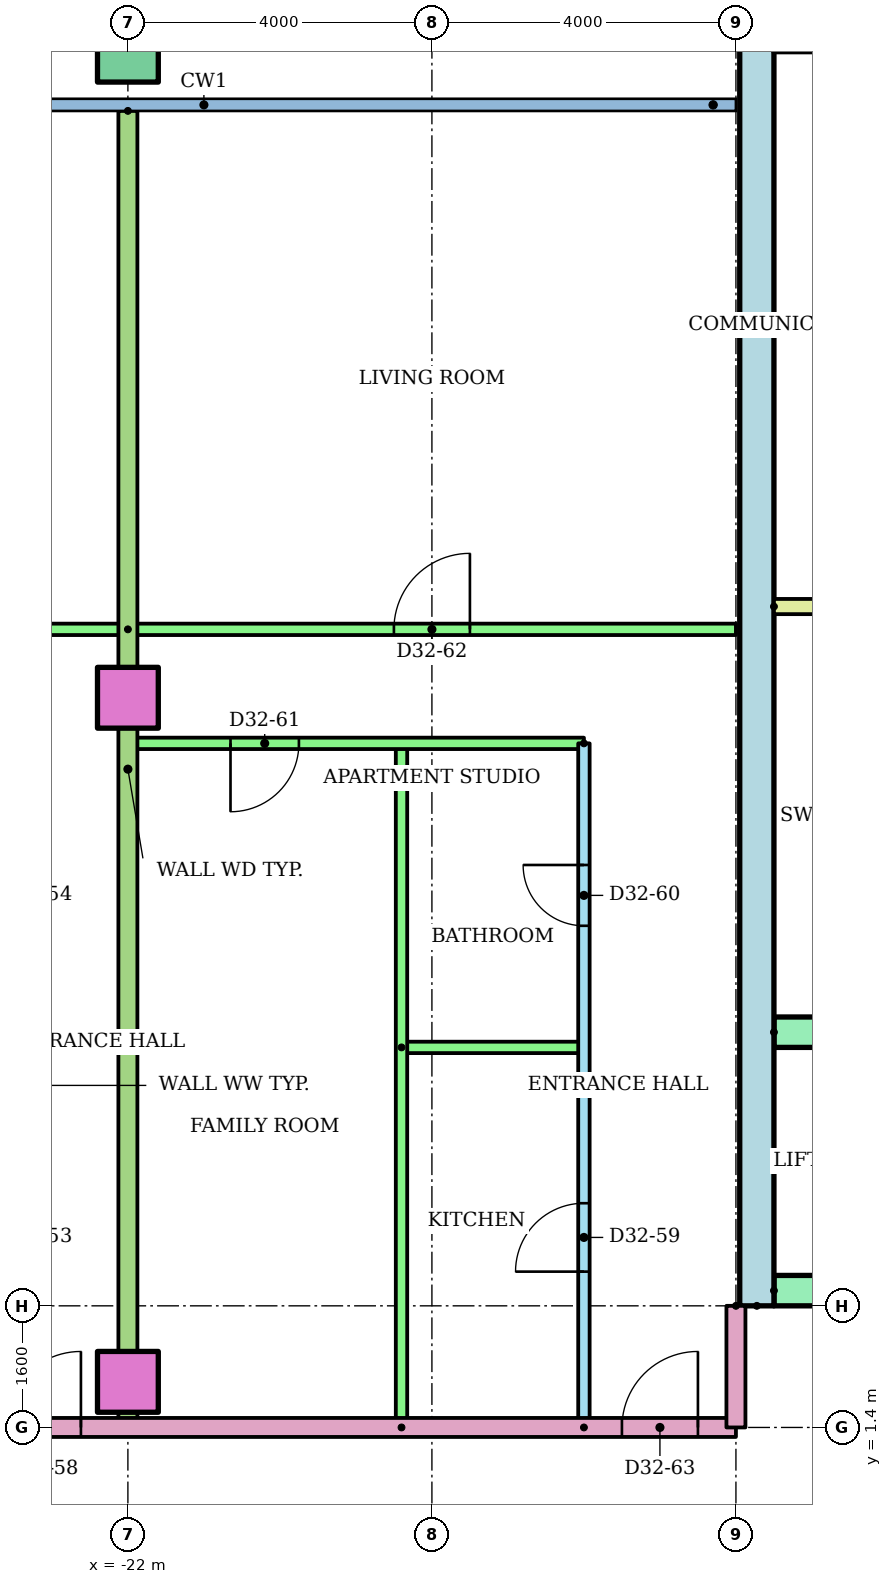
"""IFC4 building model, lengths in metres.
Left out: names, types, materials, properties, quantities, classifications, styles, units other than length and angle.
Written with IfcOpenShell. Run it as: python <this file> out.ifc"""

import sys

from ifc_helpers import new_model, si_unit, direction, frame, frame_2d, origin, origin_2d, place, context, subcontext, project, spatial, rectangle, hollow_rectangle, extrude, element, fill, save


model = new_model("IFC4")
c1 = context("Model", 3, precision=1e-05, world=origin(), true_north=direction((0.0, 1.0)))
c2 = subcontext(c1, "Body", "Model", "MODEL_VIEW")
j1 = project(units=[si_unit("LENGTHUNIT", "METRE"), si_unit("PLANEANGLEUNIT", "RADIAN")], contexts=[c1])
p1 = place(None, origin())
s1 = spatial("IfcSite", under=j1, at=p1, CompositionType="ELEMENT")
p2 = place(p1, origin())
s2 = spatial("IfcBuilding", under=s1, at=p2, CompositionType="ELEMENT")
p3 = place(p2, frame((0.0, 0.0, 126.2)))
s3 = spatial("IfcBuildingStorey", under=s2, at=p3, CompositionType="ELEMENT", Elevation=126.2)
for number, where in (
    (1, (-22.0, 2.0, 0.0)),
    (2, (-22.0, 11.0, 0.0)),
):
    element("IfcColumn", number, at=place(p3, frame(where)), inside=s3, PredefinedType="COLUMN", context=c2, shape_type="SweptSolid", body=[
        extrude(rectangle(XDim=0.8, YDim=0.8, at=origin_2d()), origin(), (0.0, 0.0, 1.0), 3.2),
    ])
p4 = place(p3, frame((-22.0, 19.5, 0.0)))
e3 = element("IfcColumn", 3, at=p4, inside=s3, PredefinedType="COLUMN", context=c2, shape_type="SweptSolid", body=[
    extrude(hollow_rectangle(XDim=0.8, YDim=0.8, WallThickness=0.04, at=origin_2d()), origin(), (0.0, 0.0, 1.0), 3.2),
])
p5 = place(p3, frame((-13.725, 3.0, 0.0), z_axis=(0.0, 0.0, 1.0), x_axis=(0.0, 1.0, 0.0)))
e4 = element("IfcWall", 4, at=p5, inside=s3, PredefinedType="SHEAR", context=c2, shape_type="SweptSolid", body=[
    extrude(rectangle(XDim=17.0, YDim=0.45, at=frame_2d((8.5, 0.0))), origin(), (0.0, 0.0, 1.0), 2.92),
])
p6 = place(p3, frame((-13.5, 3.2, 0.0)))
e5 = element("IfcWall", 5, at=p6, inside=s3, PredefinedType="SHEAR", context=c2, shape_type="SweptSolid", body=[
    extrude(rectangle(XDim=27.0, YDim=0.4, at=frame_2d((13.5, 0.0))), origin(), (0.0, 0.0, 1.0), 2.92),
])
p7 = place(p6, frame((6.861, 0.0, 0.0)))
e6 = element("IfcOpeningElement", 6, at=p7, cuts=e5, PredefinedType="OPENING", context=c2, shape_type="SweptSolid", body=[
    extrude(rectangle(XDim=1.1, YDim=2.1, at=frame_2d((0.55, 1.05))), frame((0.0, 0.21, 0.0), z_axis=(0.0, -1.0, 0.0), x_axis=(1.0, 0.0, 0.0)), (0.0, 0.0, 1.0), 0.42),
])
p8 = place(p6, frame((9.906, 0.0, 0.0)))
e7 = element("IfcOpeningElement", 7, at=p8, cuts=e5, PredefinedType="OPENING", context=c2, shape_type="SweptSolid", body=[
    extrude(rectangle(XDim=1.1, YDim=2.1, at=frame_2d((0.55, 1.05))), frame((0.0, 0.21, 0.0), z_axis=(0.0, -1.0, 0.0), x_axis=(1.0, 0.0, 0.0)), (0.0, 0.0, 1.0), 0.42),
])
p9 = place(p6, frame((15.994, 0.0, 0.0)))
e8 = element("IfcOpeningElement", 8, at=p9, cuts=e5, PredefinedType="OPENING", context=c2, shape_type="SweptSolid", body=[
    extrude(rectangle(XDim=1.1, YDim=2.1, at=frame_2d((0.55, 1.05))), frame((0.0, 0.21, 0.0), z_axis=(0.0, -1.0, 0.0), x_axis=(1.0, 0.0, 0.0)), (0.0, 0.0, 1.0), 0.42),
])
p10 = place(p6, frame((19.039, 0.0, 0.0)))
e9 = element("IfcOpeningElement", 9, at=p10, cuts=e5, PredefinedType="OPENING", context=c2, shape_type="SweptSolid", body=[
    extrude(rectangle(XDim=1.1, YDim=2.1, at=frame_2d((0.55, 1.05))), frame((0.0, 0.21, 0.0), z_axis=(0.0, -1.0, 0.0), x_axis=(1.0, 0.0, 0.0)), (0.0, 0.0, 1.0), 0.42),
])
p11 = place(p6, frame((12.6, 0.0, 0.0)))
e10 = element("IfcOpeningElement", 10, at=p11, cuts=e5, PredefinedType="OPENING", context=c2, shape_type="SweptSolid", body=[
    extrude(rectangle(XDim=1.8, YDim=2.1, at=frame_2d((0.9, 1.05))), frame((0.0, 0.21, 0.0), z_axis=(0.0, -1.0, 0.0), x_axis=(1.0, 0.0, 0.0)), (0.0, 0.0, 1.0), 0.42),
])
p12 = place(p3, frame((-13.5, 6.6, 0.0)))
e11 = element("IfcWall", 11, at=p12, inside=s3, PredefinedType="SHEAR", context=c2, shape_type="SweptSolid", body=[
    extrude(rectangle(XDim=11.978, YDim=0.4, at=frame_2d((5.989, 0.0))), origin(), (0.0, 0.0, 1.0), 2.92),
])
p13 = place(p3, frame((-13.5, 12.2, 0.0)))
e12 = element("IfcWall", 12, at=p13, inside=s3, PredefinedType="PARTITIONING", context=c2, shape_type="SweptSolid", body=[
    extrude(rectangle(XDim=3.9, YDim=0.2, at=frame_2d((1.95, 0.0))), origin(), (0.0, 0.0, 1.0), 2.92),
])
p14 = place(p3, frame((-32.72, 11.9, 0.0)))
e13 = element("IfcWall", 13, at=p14, inside=s3, PredefinedType="PARTITIONING", context=c2, shape_type="SweptSolid", body=[
    extrude(rectangle(XDim=10.72, YDim=0.15, at=frame_2d((5.36, 0.0))), origin(), (0.0, 0.0, 1.0), 2.4),
])
p15 = place(p14, frame((1.102, 0.0, 0.0)))
e14 = element("IfcOpeningElement", 14, at=p15, cuts=e13, PredefinedType="OPENING", context=c2, shape_type="SweptSolid", body=[
    extrude(rectangle(XDim=1.0, YDim=2.1, at=frame_2d((0.5, 1.05))), frame((0.0, 0.085, 0.0), z_axis=(0.0, -1.0, 0.0), x_axis=(1.0, 0.0, 0.0)), (0.0, 0.0, 1.0), 0.17),
])
p16 = place(p14, frame((7.22, 0.0, 0.0)))
e15 = element("IfcOpeningElement", 15, at=p16, cuts=e13, PredefinedType="OPENING", context=c2, shape_type="SweptSolid", body=[
    extrude(rectangle(XDim=1.0, YDim=2.1, at=frame_2d((0.5, 1.05))), frame((0.0, 0.085, 0.0), z_axis=(0.0, -1.0, 0.0), x_axis=(1.0, 0.0, 0.0)), (0.0, 0.0, 1.0), 0.17),
])
p17 = place(p3, frame((-16.0, 1.4, 0.0), z_axis=(0.0, 0.0, 1.0), x_axis=(0.0, 1.0, 0.0)))
e16 = element("IfcWall", 16, at=p17, inside=s3, PredefinedType="PARTITIONING", context=c2, shape_type="SweptSolid", body=[
    extrude(rectangle(XDim=9.0, YDim=0.15, at=frame_2d((4.5, 0.0))), origin(), (0.0, 0.0, 1.0), 2.4),
])
p18 = place(p17, frame((2.05, 0.0, 0.0)))
e17 = element("IfcOpeningElement", 17, at=p18, cuts=e16, PredefinedType="OPENING", context=c2, shape_type="SweptSolid", body=[
    extrude(rectangle(XDim=0.9, YDim=2.1, at=frame_2d((0.45, 1.05))), frame((0.0, 0.085, 0.0), z_axis=(0.0, -1.0, 0.0), x_axis=(1.0, 0.0, 0.0)), (0.0, 0.0, 1.0), 0.17),
])
p19 = place(p17, frame((6.6, 0.0, 0.0)))
e18 = element("IfcOpeningElement", 18, at=p19, cuts=e16, PredefinedType="OPENING", context=c2, shape_type="SweptSolid", body=[
    extrude(rectangle(XDim=0.8, YDim=2.1, at=frame_2d((0.4, 1.05))), frame((0.0, 0.085, 0.0), z_axis=(0.0, -1.0, 0.0), x_axis=(1.0, 0.0, 0.0)), (0.0, 0.0, 1.0), 0.17),
])
p20 = place(p3, frame((-18.4, 6.4, 0.0)))
e19 = element("IfcWall", 19, at=p20, inside=s3, PredefinedType="PARTITIONING", context=c2, shape_type="SweptSolid", body=[
    extrude(rectangle(XDim=2.4, YDim=0.15, at=frame_2d((1.2, 0.0))), origin(), (0.0, 0.0, 1.0), 2.4),
])
p21 = place(p3, frame((-18.4, 1.4, 0.0), z_axis=(0.0, 0.0, 1.0), x_axis=(0.0, 1.0, 0.0)))
e20 = element("IfcWall", 20, at=p21, inside=s3, PredefinedType="PARTITIONING", context=c2, shape_type="SweptSolid", body=[
    extrude(rectangle(XDim=9.0, YDim=0.15, at=frame_2d((4.5, 0.0))), origin(), (0.0, 0.0, 1.0), 2.4),
])
p22 = place(p3, frame((-16.0, 10.4, 0.0), z_axis=(0.0, 0.0, 1.0), x_axis=(-1.0, 0.0, 0.0)))
e21 = element("IfcWall", 21, at=p22, inside=s3, PredefinedType="PARTITIONING", context=c2, shape_type="SweptSolid", body=[
    extrude(rectangle(XDim=6.0, YDim=0.15, at=frame_2d((3.0, 0.0))), origin(), (0.0, 0.0, 1.0), 2.4),
])
p23 = place(p22, frame((3.75, 0.0, 0.0)))
e22 = element("IfcOpeningElement", 22, at=p23, cuts=e21, PredefinedType="OPENING", context=c2, shape_type="SweptSolid", body=[
    extrude(rectangle(XDim=0.9, YDim=2.1, at=frame_2d((0.45, 1.05))), frame((0.0, 0.085, 0.0), z_axis=(0.0, -1.0, 0.0), x_axis=(1.0, 0.0, 0.0)), (0.0, 0.0, 1.0), 0.17),
])
p24 = place(p3, frame((-22.0, 11.9, 0.0)))
e23 = element("IfcWall", 23, at=p24, inside=s3, PredefinedType="PARTITIONING", context=c2, shape_type="SweptSolid", body=[
    extrude(rectangle(XDim=8.0, YDim=0.15, at=frame_2d((4.0, 0.0))), origin(), (0.0, 0.0, 1.0), 2.4),
])
p25 = place(p24, frame((3.5, 0.0, 0.0)))
e24 = element("IfcOpeningElement", 24, at=p25, cuts=e23, PredefinedType="OPENING", context=c2, shape_type="SweptSolid", body=[
    extrude(rectangle(XDim=1.0, YDim=2.1, at=frame_2d((0.5, 1.05))), frame((0.0, 0.085, 0.0), z_axis=(0.0, -1.0, 0.0), x_axis=(1.0, 0.0, 0.0)), (0.0, 0.0, 1.0), 0.17),
])
p26 = place(p3, frame((-22.0, 18.721, 0.0), z_axis=(0.0, 0.0, 1.0), x_axis=(0.0, -1.0, 0.0)))
e25 = element("IfcWall", 25, at=p26, inside=s3, PredefinedType="PARTITIONING", context=c2, shape_type="SweptSolid", body=[
    extrude(rectangle(XDim=17.321, YDim=0.25, at=frame_2d((8.661, 0.0))), origin(), (0.0, 0.0, 1.0), 2.4),
])
p27 = place(p3, frame((-29.0, 1.4, 0.0)))
e26 = element("IfcWall", 26, at=p27, inside=s3, PredefinedType="PARTITIONING", context=c2, shape_type="SweptSolid", body=[
    extrude(rectangle(XDim=15.0, YDim=0.25, at=frame_2d((7.5, 0.0))), origin(), (0.0, 0.0, 1.0), 2.4),
])
p28 = place(p27, frame((5.382, 0.0, 0.0)))
e27 = element("IfcOpeningElement", 27, at=p28, cuts=e26, PredefinedType="OPENING", context=c2, shape_type="SweptSolid", body=[
    extrude(rectangle(XDim=1.0, YDim=2.1, at=frame_2d((0.5, 1.05))), frame((0.0, 0.135, 0.0), z_axis=(0.0, -1.0, 0.0), x_axis=(1.0, 0.0, 0.0)), (0.0, 0.0, 1.0), 0.27),
])
p29 = place(p27, frame((13.5, 0.0, 0.0)))
e28 = element("IfcOpeningElement", 28, at=p29, cuts=e26, PredefinedType="OPENING", context=c2, shape_type="SweptSolid", body=[
    extrude(rectangle(XDim=1.0, YDim=2.1, at=frame_2d((0.5, 1.05))), frame((0.0, 0.135, 0.0), z_axis=(0.0, -1.0, 0.0), x_axis=(1.0, 0.0, 0.0)), (0.0, 0.0, 1.0), 0.27),
])
p30 = place(p3, frame((-14.0, 3.0, 0.0), z_axis=(0.0, 0.0, 1.0), x_axis=(0.0, -1.0, 0.0)))
e29 = element("IfcWall", 29, at=p30, inside=s3, PredefinedType="PARTITIONING", context=c2, shape_type="SweptSolid", body=[
    extrude(rectangle(XDim=1.6, YDim=0.25, at=frame_2d((0.8, 0.0))), origin(), (0.0, 0.0, 1.0), 2.4),
])
p31 = place(p28, origin())
e30 = element("IfcDoor", 30, at=p31, inside=s3, OperationType="SINGLE_SWING_RIGHT", PredefinedType="DOOR", context=c2, shape_type="SweptSolid", body=[
    extrude(rectangle(XDim=1.0, YDim=2.1, at=frame_2d((0.5, 1.05))), frame((0.0, 0.025, 0.0), z_axis=(0.0, -1.0, 0.0), x_axis=(1.0, 0.0, 0.0)), (0.0, 0.0, 1.0), 0.05),
])
fill(e27, e30)
p32 = place(p18, origin())
e31 = element("IfcDoor", 31, at=p32, inside=s3, OperationType="SINGLE_SWING_LEFT", PredefinedType="DOOR", context=c2, shape_type="SweptSolid", body=[
    extrude(rectangle(XDim=0.9, YDim=2.1, at=frame_2d((0.45, 1.05))), frame((0.0, 0.025, 0.0), z_axis=(0.0, -1.0, 0.0), x_axis=(1.0, 0.0, 0.0)), (0.0, 0.0, 1.0), 0.05),
])
fill(e17, e31)
p33 = place(p19, origin())
e32 = element("IfcDoor", 32, at=p33, inside=s3, OperationType="SINGLE_SWING_RIGHT", PredefinedType="DOOR", context=c2, shape_type="SweptSolid", body=[
    extrude(rectangle(XDim=0.8, YDim=2.1, at=frame_2d((0.4, 1.05))), frame((0.0, 0.025, 0.0), z_axis=(0.0, -1.0, 0.0), x_axis=(1.0, 0.0, 0.0)), (0.0, 0.0, 1.0), 0.05),
])
fill(e18, e32)
p34 = place(p23, origin())
e33 = element("IfcDoor", 33, at=p34, inside=s3, OperationType="SINGLE_SWING_RIGHT", PredefinedType="DOOR", context=c2, shape_type="SweptSolid", body=[
    extrude(rectangle(XDim=0.9, YDim=2.1, at=frame_2d((0.45, 1.05))), frame((0.0, 0.025, 0.0), z_axis=(0.0, -1.0, 0.0), x_axis=(1.0, 0.0, 0.0)), (0.0, 0.0, 1.0), 0.05),
])
fill(e22, e33)
p35 = place(p25, origin())
e34 = element("IfcDoor", 34, at=p35, inside=s3, OperationType="SINGLE_SWING_RIGHT", PredefinedType="DOOR", context=c2, shape_type="SweptSolid", body=[
    extrude(rectangle(XDim=1.0, YDim=2.1, at=frame_2d((0.5, 1.05))), frame((0.0, 0.025, 0.0), z_axis=(0.0, -1.0, 0.0), x_axis=(1.0, 0.0, 0.0)), (0.0, 0.0, 1.0), 0.05),
])
fill(e24, e34)
p36 = place(p29, origin())
e35 = element("IfcDoor", 35, at=p36, inside=s3, OperationType="SINGLE_SWING_RIGHT", PredefinedType="DOOR", context=c2, shape_type="SweptSolid", body=[
    extrude(rectangle(XDim=1.0, YDim=2.1, at=frame_2d((0.5, 1.05))), frame((0.0, 0.025, 0.0), z_axis=(0.0, -1.0, 0.0), x_axis=(1.0, 0.0, 0.0)), (0.0, 0.0, 1.0), 0.05),
])
fill(e28, e35)
save(model, sys.argv[1])
